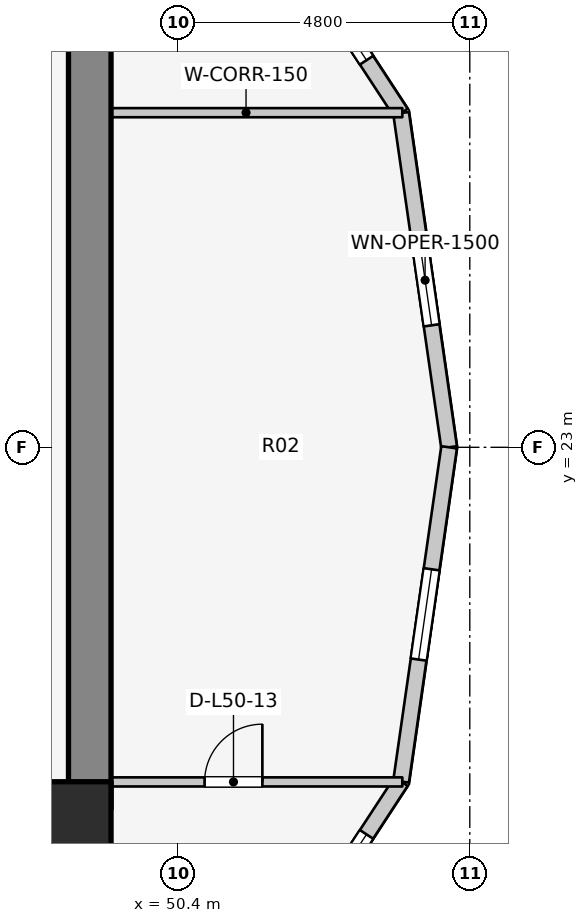
"""IFC4 building model, lengths in metres.
Left out: names, types, materials, properties, quantities, classifications, styles, units other than length and angle.
Written with IfcOpenShell. Run it as: python <this file> out.ifc"""

import sys

from ifc_helpers import new_model, si_unit, direction, frame, frame_2d, origin, origin_2d, place, context, subcontext, project, spatial, rectangle, extrude, element, fill, save


model = new_model("IFC4")
c1 = context("Model", 3, precision=1e-05, world=origin(), true_north=direction((0.0, 1.0)))
c2 = subcontext(c1, "Body", "Model", "MODEL_VIEW")
j1 = project(units=[si_unit("LENGTHUNIT", "METRE"), si_unit("PLANEANGLEUNIT", "RADIAN")], contexts=[c1])
p1 = place(None, origin())
s1 = spatial("IfcSite", under=j1, at=p1, CompositionType="ELEMENT")
p2 = place(p1, origin())
s2 = spatial("IfcBuilding", under=s1, at=p2, CompositionType="ELEMENT")
p3 = place(p2, frame((0.0, 0.0, 165.3)))
s3 = spatial("IfcBuildingStorey", under=s2, at=p3, CompositionType="ELEMENT", Elevation=165.3)
p4 = place(p3, frame((48.95, 17.05, 0.0), z_axis=(0.0, 0.0, 1.0), x_axis=(0.0, 1.0, 0.0)))
e1 = element("IfcWall", 1, at=p4, inside=s3, PredefinedType="SHEAR", context=c2, shape_type="SweptSolid", body=[
    extrude(rectangle(XDim=12.8, YDim=0.7, at=frame_2d((6.4, 0.0))), origin(), (0.0, 0.0, 1.0), 3.1),
])
p5 = place(p3, frame((48.7, 16.9, 0.0), z_axis=(0.0, 0.0, 1.0), x_axis=(1.0, 0.0, 0.0)))
e2 = element("IfcColumn", 2, at=p5, inside=s3, PredefinedType="COLUMN", context=c2, shape_type="SweptSolid", body=[
    extrude(rectangle(XDim=1.2, YDim=1.2, at=origin_2d()), origin(), (0.0, 0.0, 1.0), 3.1),
])
p6 = place(p3, frame((54.86, 23.0, 0.0), z_axis=(0.0, 0.0, 1.0), x_axis=(-0.142227632286, 0.989833976288, 0.0)))
e3 = element("IfcWall", 3, at=p6, inside=s3, PredefinedType="STANDARD", context=c2, shape_type="SweptSolid", body=[
    extrude(rectangle(XDim=5.553, YDim=0.26, at=frame_2d((2.776, 0.0))), origin(), (0.0, 0.0, 1.0), 2.85),
])
p7 = place(p6, frame((2.027, 0.0, 0.75)))
e4 = element("IfcOpeningElement", 4, at=p7, cuts=e3, PredefinedType="OPENING", context=c2, shape_type="SweptSolid", body=[
    extrude(rectangle(XDim=1.5, YDim=1.6, at=frame_2d((0.75, 0.8))), frame((0.0, 0.14, 0.0), z_axis=(0.0, -1.0, 0.0), x_axis=(1.0, 0.0, 0.0)), (0.0, 0.0, 1.0), 0.28),
])
p8 = place(p3, frame((54.07, 28.497, 0.0), z_axis=(0.0, 0.0, 1.0), x_axis=(-0.547456494366, 0.836834145322, 0.0)))
e5 = element("IfcWall", 5, at=p8, inside=s3, PredefinedType="STANDARD", context=c2, shape_type="SweptSolid", body=[
    extrude(rectangle(XDim=4.477, YDim=0.26, at=frame_2d((2.239, 0.0))), origin(), (0.0, 0.0, 1.0), 2.85),
])
p9 = place(p8, frame((1.039, 0.0, 0.75)))
e6 = element("IfcOpeningElement", 6, at=p9, cuts=e5, PredefinedType="OPENING", context=c2, shape_type="SweptSolid", body=[
    extrude(rectangle(XDim=2.4, YDim=1.7, at=frame_2d((1.2, 0.85))), frame((0.0, 0.14, 0.0), z_axis=(0.0, -1.0, 0.0), x_axis=(1.0, 0.0, 0.0)), (0.0, 0.0, 1.0), 0.28),
])
p10 = place(p3, frame((51.619, 13.757, 0.0), z_axis=(0.0, 0.0, 1.0), x_axis=(0.547456494366, 0.836834145322, 0.0)))
e7 = element("IfcWall", 7, at=p10, inside=s3, PredefinedType="STANDARD", context=c2, shape_type="SweptSolid", body=[
    extrude(rectangle(XDim=4.477, YDim=0.26, at=frame_2d((2.239, 0.0))), origin(), (0.0, 0.0, 1.0), 2.85),
])
p11 = place(p10, frame((1.039, 0.0, 0.75)))
e8 = element("IfcOpeningElement", 8, at=p11, cuts=e7, PredefinedType="OPENING", context=c2, shape_type="SweptSolid", body=[
    extrude(rectangle(XDim=2.4, YDim=1.7, at=frame_2d((1.2, 0.85))), frame((0.0, 0.14, 0.0), z_axis=(0.0, -1.0, 0.0), x_axis=(1.0, 0.0, 0.0)), (0.0, 0.0, 1.0), 0.28),
])
p12 = place(p3, frame((54.07, 17.503, 0.0), z_axis=(0.0, 0.0, 1.0), x_axis=(0.142227632286, 0.989833976288, 0.0)))
e9 = element("IfcWall", 9, at=p12, inside=s3, PredefinedType="STANDARD", context=c2, shape_type="SweptSolid", body=[
    extrude(rectangle(XDim=5.553, YDim=0.26, at=frame_2d((2.776, 0.0))), origin(), (0.0, 0.0, 1.0), 2.85),
])
p13 = place(p12, frame((2.027, 0.0, 0.75)))
e10 = element("IfcOpeningElement", 10, at=p13, cuts=e9, PredefinedType="OPENING", context=c2, shape_type="SweptSolid", body=[
    extrude(rectangle(XDim=1.5, YDim=1.6, at=frame_2d((0.75, 0.8))), frame((0.0, 0.14, 0.0), z_axis=(0.0, -1.0, 0.0), x_axis=(1.0, 0.0, 0.0)), (0.0, 0.0, 1.0), 0.28),
])
p14 = place(p3, frame((48.95, 17.497, 0.0), z_axis=(0.0, 0.0, 1.0), x_axis=(1.0, 0.0, 0.0)))
e11 = element("IfcWall", 11, at=p14, inside=s3, PredefinedType="PARTITIONING", context=c2, shape_type="SweptSolid", body=[
    extrude(rectangle(XDim=5.14, YDim=0.15, at=frame_2d((2.57, 0.0))), origin(), (0.0, 0.0, 1.0), 2.855),
])
p15 = place(p14, frame((1.889, 0.0, 0.0)))
e12 = element("IfcOpeningElement", 12, at=p15, cuts=e11, PredefinedType="OPENING", context=c2, shape_type="SweptSolid", body=[
    extrude(rectangle(XDim=0.95, YDim=2.1, at=frame_2d((0.475, 1.05))), frame((0.0, 0.085, 0.0), z_axis=(0.0, -1.0, 0.0), x_axis=(1.0, 0.0, 0.0)), (0.0, 0.0, 1.0), 0.17),
])
p16 = place(p3, frame((48.95, 28.503, 0.0), z_axis=(0.0, 0.0, 1.0), x_axis=(1.0, 0.0, 0.0)))
e13 = element("IfcWall", 13, at=p16, inside=s3, PredefinedType="PARTITIONING", context=c2, shape_type="SweptSolid", body=[
    extrude(rectangle(XDim=5.14, YDim=0.15, at=frame_2d((2.57, 0.0))), origin(), (0.0, 0.0, 1.0), 2.855),
])
p17 = place(p7, origin())
e14 = element("IfcWindow", 14, at=p17, inside=s3, PartitioningType="SINGLE_PANEL", PredefinedType="WINDOW", context=c2, shape_type="SweptSolid", body=[
    extrude(rectangle(XDim=1.5, YDim=1.6, at=frame_2d((0.75, 0.8))), frame((0.0, 0.03, 0.0), z_axis=(0.0, -1.0, 0.0), x_axis=(1.0, 0.0, 0.0)), (0.0, 0.0, 1.0), 0.06),
])
fill(e4, e14)
p18 = place(p9, origin())
e15 = element("IfcWindow", 15, at=p18, inside=s3, PartitioningType="SINGLE_PANEL", PredefinedType="WINDOW", context=c2, shape_type="SweptSolid", body=[
    extrude(rectangle(XDim=2.4, YDim=1.7, at=frame_2d((1.2, 0.85))), frame((0.0, 0.03, 0.0), z_axis=(0.0, -1.0, 0.0), x_axis=(1.0, 0.0, 0.0)), (0.0, 0.0, 1.0), 0.06),
])
fill(e6, e15)
p19 = place(p11, origin())
e16 = element("IfcWindow", 16, at=p19, inside=s3, PartitioningType="SINGLE_PANEL", PredefinedType="WINDOW", context=c2, shape_type="SweptSolid", body=[
    extrude(rectangle(XDim=2.4, YDim=1.7, at=frame_2d((1.2, 0.85))), frame((0.0, 0.03, 0.0), z_axis=(0.0, -1.0, 0.0), x_axis=(1.0, 0.0, 0.0)), (0.0, 0.0, 1.0), 0.06),
])
fill(e8, e16)
p20 = place(p13, origin())
e17 = element("IfcWindow", 17, at=p20, inside=s3, PartitioningType="SINGLE_PANEL", PredefinedType="WINDOW", context=c2, shape_type="SweptSolid", body=[
    extrude(rectangle(XDim=1.5, YDim=1.6, at=frame_2d((0.75, 0.8))), frame((0.0, 0.03, 0.0), z_axis=(0.0, -1.0, 0.0), x_axis=(1.0, 0.0, 0.0)), (0.0, 0.0, 1.0), 0.06),
])
fill(e10, e17)
p21 = place(p15, origin())
e18 = element("IfcDoor", 18, at=p21, inside=s3, OperationType="SINGLE_SWING_RIGHT", PredefinedType="DOOR", context=c2, shape_type="SweptSolid", body=[
    extrude(rectangle(XDim=0.95, YDim=2.1, at=frame_2d((0.475, 1.05))), frame((0.0, 0.025, 0.0), z_axis=(0.0, -1.0, 0.0), x_axis=(1.0, 0.0, 0.0)), (0.0, 0.0, 1.0), 0.05),
])
fill(e12, e18)
save(model, sys.argv[1])
